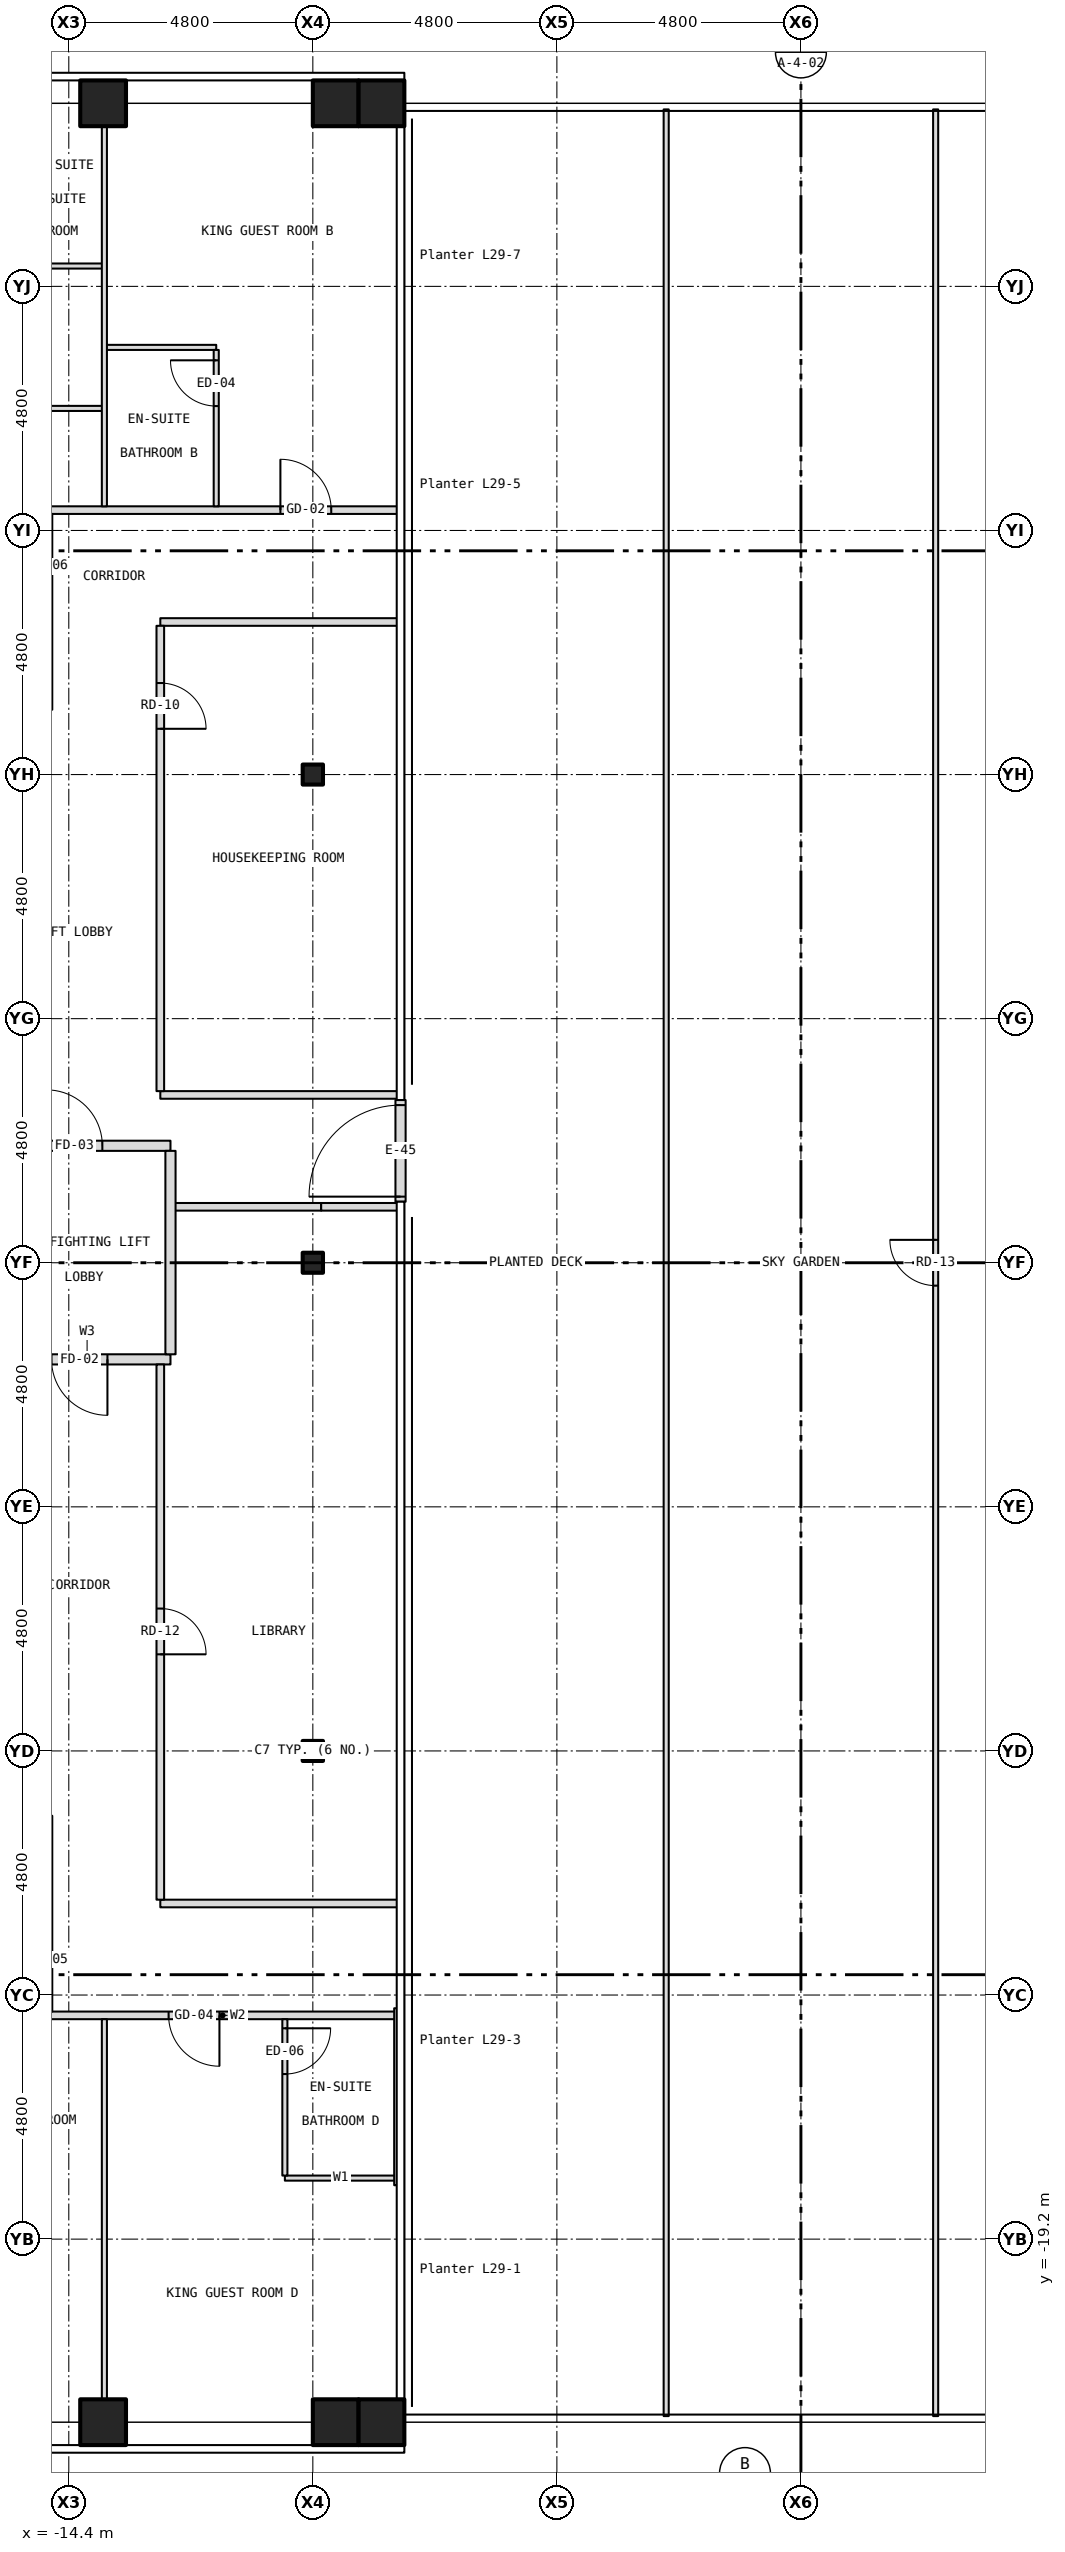
"""IFC4 building model, lengths in metres.
Left out: names, types, materials, properties, quantities, classifications, styles, units other than length and angle.
Written with IfcOpenShell. Run it as: python <this file> out.ifc"""

import sys

from ifc_helpers import new_model, si_unit, direction, frame, frame_2d, origin, origin_2d, place, context, subcontext, project, spatial, rectangle, hollow_rectangle, i_section, extrude, element, fill, save


model = new_model("IFC4")
c1 = context("Model", 3, precision=1e-05, world=origin(), true_north=direction((0.0, 1.0)))
c2 = subcontext(c1, "Body", "Model", "MODEL_VIEW")
j1 = project(units=[si_unit("LENGTHUNIT", "METRE"), si_unit("PLANEANGLEUNIT", "RADIAN")], contexts=[c1])
p1 = place(None, origin())
s1 = spatial("IfcSite", under=j1, at=p1, CompositionType="ELEMENT")
p2 = place(p1, origin())
s2 = spatial("IfcBuilding", under=s1, at=p2, CompositionType="ELEMENT")
p3 = place(p2, frame((0.0, 0.0, 117.0)))
s3 = spatial("IfcBuildingStorey", under=s2, at=p3, CompositionType="ELEMENT", Elevation=117.0)
for number, where, z_axis, x_axis in (
    (1, (-13.725, 22.8, -0.15), (0.0, 0.0, 1.0), (1.0, 0.0, 0.0)),
    (2, (-13.725, -22.8, -0.15), (0.0, 0.0, 1.0), (1.0, 0.0, 0.0)),
    (3, (-9.15, 22.8, -0.15), (0.0, 0.0, 1.0), (1.0, 0.0, 0.0)),
    (4, (-9.15, -22.8, -0.15), (0.0, 0.0, 1.0), (1.0, 0.0, 0.0)),
    (5, (-8.25, 22.8, -0.15), (0.0, 0.0, 1.0), (1.0, 0.0, 0.0)),
    (6, (-8.25, -22.8, -0.15), (0.0, 0.0, 1.0), (1.0, 0.0, 0.0)),
):
    element("IfcColumn", number, at=place(p3, frame(where, z_axis=z_axis, x_axis=x_axis)), inside=s3, PredefinedType="COLUMN", context=c2, shape_type="SweptSolid", body=[
        extrude(hollow_rectangle(XDim=0.9, YDim=0.9, WallThickness=0.05, at=origin_2d()), origin(), (0.0, 0.0, 1.0), 3.5),
    ])
for number, where, z_axis, x_axis in (
    (7, (-9.6, -9.6, -0.15), (0.0, 0.0, 1.0), (1.0, 0.0, 0.0)),
    (8, (-9.6, 0.0, -0.15), (0.0, 0.0, 1.0), (1.0, 0.0, 0.0)),
    (9, (-9.6, 9.6, -0.15), (0.0, 0.0, 1.0), (1.0, 0.0, 0.0)),
):
    element("IfcColumn", number, at=place(p3, frame(where, z_axis=z_axis, x_axis=x_axis)), inside=s3, PredefinedType="COLUMN", context=c2, shape_type="SweptSolid", body=[
        extrude(i_section(OverallWidth=0.399, OverallDepth=0.394, WebThickness=0.023, FlangeThickness=0.037, at=origin_2d()), origin(), (0.0, 0.0, 1.0), 3.5),
    ])
p4 = place(p3, frame((-7.875, 1.2, 0.0), z_axis=(0.0, 0.0, 1.0), x_axis=(0.0, 1.0, 0.0)))
e10 = element("IfcWall", 10, at=p4, inside=s3, PredefinedType="SOLIDWALL", context=c2, shape_type="SweptSolid", body=[
    extrude(rectangle(XDim=2.0, YDim=0.2, at=frame_2d((1.0, 0.0))), origin(), (0.0, 0.0, 1.0), 2.593),
])
p5 = place(p4, frame((0.1, 0.0, 0.0)))
e11 = element("IfcOpeningElement", 11, at=p5, cuts=e10, PredefinedType="OPENING", context=c2, shape_type="SweptSolid", body=[
    extrude(rectangle(XDim=1.8, YDim=2.1, at=frame_2d((0.9, 1.05))), frame((0.0, 0.112, 0.0), z_axis=(0.0, -1.0, 0.0), x_axis=(1.0, 0.0, 0.0)), (0.0, 0.0, 1.0), 0.224),
])
p6 = place(p3, frame((-10.15, -18.0, 0.0), z_axis=(0.0, 0.0, 1.0), x_axis=(1.0, 0.0, 0.0)))
e12 = element("IfcWall", 12, at=p6, inside=s3, PredefinedType="PARTITIONING", context=c2, shape_type="SweptSolid", body=[
    extrude(rectangle(XDim=2.2, YDim=0.1, at=frame_2d((1.1, 0.0))), origin(), (0.0, 0.0, 1.0), 3.35),
])
p7 = place(p3, frame((-14.8, -14.8, 0.0), z_axis=(0.0, 0.0, 1.0), x_axis=(1.0, 0.0, 0.0)))
e13 = element("IfcWall", 13, at=p7, inside=s3, PredefinedType="PARTITIONING", context=c2, shape_type="SweptSolid", body=[
    extrude(rectangle(XDim=6.85, YDim=0.15, at=frame_2d((3.425, 0.0))), origin(), (0.0, 0.0, 1.0), 3.35),
])
p8 = place(p7, frame((2.363, 0.0, 0.0)))
e14 = element("IfcOpeningElement", 14, at=p8, cuts=e13, PredefinedType="OPENING", context=c2, shape_type="SweptSolid", body=[
    extrude(rectangle(XDim=1.0, YDim=2.1, at=frame_2d((0.5, 1.05))), frame((0.0, 0.087, 0.0), z_axis=(0.0, -1.0, 0.0), x_axis=(1.0, 0.0, 0.0)), (0.0, 0.0, 1.0), 0.174),
])
p9 = place(p3, frame((-12.6, -12.6, 0.0), z_axis=(0.0, 0.0, 1.0), x_axis=(1.0, 0.0, 0.0)))
e15 = element("IfcWall", 15, at=p9, inside=s3, PredefinedType="PARTITIONING", context=c2, shape_type="SweptSolid", body=[
    extrude(rectangle(XDim=4.68, YDim=0.15, at=frame_2d((2.34, 0.0))), origin(), (0.0, 0.0, 1.0), 3.35),
])
p10 = place(p3, frame((-15.68, -1.9, 0.0), z_axis=(0.0, 0.0, 1.0), x_axis=(1.0, 0.0, 0.0)))
e16 = element("IfcWall", 16, at=p10, inside=s3, PredefinedType="PARTITIONING", context=c2, shape_type="SweptSolid", body=[
    extrude(rectangle(XDim=3.28, YDim=0.2, at=frame_2d((1.64, 0.0))), origin(), (0.0, 0.0, 1.0), 3.35),
])
p11 = place(p10, frame((0.94, 0.0, 0.0)))
e17 = element("IfcOpeningElement", 17, at=p11, cuts=e16, PredefinedType="OPENING", context=c2, shape_type="SweptSolid", body=[
    extrude(rectangle(XDim=1.1, YDim=2.1, at=frame_2d((0.55, 1.05))), frame((0.0, 0.112, 0.0), z_axis=(0.0, -1.0, 0.0), x_axis=(1.0, 0.0, 0.0)), (0.0, 0.0, 1.0), 0.224),
])
p12 = place(p3, frame((-12.4, 1.1, 0.0), z_axis=(0.0, 0.0, 1.0), x_axis=(1.0, 0.0, 0.0)))
e18 = element("IfcWall", 18, at=p12, inside=s3, PredefinedType="PARTITIONING", context=c2, shape_type="SweptSolid", body=[
    extrude(rectangle(XDim=2.964, YDim=0.15, at=frame_2d((1.482, 0.0))), origin(), (0.0, 0.0, 1.0), 3.35),
])
p13 = place(p3, frame((-9.436, 1.1, 0.0), z_axis=(0.0, 0.0, 1.0), x_axis=(1.0, 0.0, 0.0)))
e19 = element("IfcWall", 19, at=p13, inside=s3, PredefinedType="PARTITIONING", context=c2, shape_type="SweptSolid", body=[
    extrude(rectangle(XDim=1.516, YDim=0.15, at=frame_2d((0.758, 0.0))), origin(), (0.0, 0.0, 1.0), 2.593),
])
p14 = place(p3, frame((-15.68, 2.3, 0.0), z_axis=(0.0, 0.0, 1.0), x_axis=(1.0, 0.0, 0.0)))
e20 = element("IfcWall", 20, at=p14, inside=s3, PredefinedType="PARTITIONING", context=c2, shape_type="SweptSolid", body=[
    extrude(rectangle(XDim=3.28, YDim=0.2, at=frame_2d((1.64, 0.0))), origin(), (0.0, 0.0, 1.0), 3.35),
])
p15 = place(p14, frame((0.84, 0.0, 0.0)))
e21 = element("IfcOpeningElement", 21, at=p15, cuts=e20, PredefinedType="OPENING", context=c2, shape_type="SweptSolid", body=[
    extrude(rectangle(XDim=1.1, YDim=2.1, at=frame_2d((0.55, 1.05))), frame((0.0, 0.112, 0.0), z_axis=(0.0, -1.0, 0.0), x_axis=(1.0, 0.0, 0.0)), (0.0, 0.0, 1.0), 0.224),
])
for number, where, z_axis, x_axis in (
    (22, (-12.6, 3.3, 0.0), (0.0, 0.0, 1.0), (1.0, 0.0, 0.0)),
    (23, (-12.6, 12.6, 0.0), (0.0, 0.0, 1.0), (1.0, 0.0, 0.0)),
):
    element("IfcWall", number, at=place(p3, frame(where, z_axis=z_axis, x_axis=x_axis)), inside=s3, PredefinedType="PARTITIONING", context=c2, shape_type="SweptSolid", body=[
        extrude(rectangle(XDim=4.68, YDim=0.15, at=frame_2d((2.34, 0.0))), origin(), (0.0, 0.0, 1.0), 3.35),
    ])
p16 = place(p3, frame((-14.8, 14.8, 0.0), z_axis=(0.0, 0.0, 1.0), x_axis=(1.0, 0.0, 0.0)))
e24 = element("IfcWall", 24, at=p16, inside=s3, PredefinedType="PARTITIONING", context=c2, shape_type="SweptSolid", body=[
    extrude(rectangle(XDim=6.88, YDim=0.15, at=frame_2d((3.44, 0.0))), origin(), (0.0, 0.0, 1.0), 3.35),
])
p17 = place(p16, frame((4.562, 0.0, 0.0)))
e25 = element("IfcOpeningElement", 25, at=p17, cuts=e24, PredefinedType="OPENING", context=c2, shape_type="SweptSolid", body=[
    extrude(rectangle(XDim=1.0, YDim=2.1, at=frame_2d((0.5, 1.05))), frame((0.0, 0.087, 0.0), z_axis=(0.0, -1.0, 0.0), x_axis=(1.0, 0.0, 0.0)), (0.0, 0.0, 1.0), 0.174),
])
p18 = place(p3, frame((-23.28, 16.8, 0.0), z_axis=(0.0, 0.0, 1.0), x_axis=(1.0, 0.0, 0.0)))
e26 = element("IfcWall", 26, at=p18, inside=s3, PredefinedType="PARTITIONING", context=c2, shape_type="SweptSolid", body=[
    extrude(rectangle(XDim=9.58, YDim=0.1, at=frame_2d((4.79, 0.0))), origin(), (0.0, 0.0, 1.0), 3.35),
])
p19 = place(p18, frame((5.468, 0.0, 0.0)))
e27 = element("IfcOpeningElement", 27, at=p19, cuts=e26, PredefinedType="OPENING", context=c2, shape_type="SweptSolid", body=[
    extrude(rectangle(XDim=0.9, YDim=2.1, at=frame_2d((0.45, 1.05))), frame((0.0, 0.062, 0.0), z_axis=(0.0, -1.0, 0.0), x_axis=(1.0, 0.0, 0.0)), (0.0, 0.0, 1.0), 0.124),
])
for number, where, z_axis, x_axis in (
    (28, (-13.7, 18.0, 0.0), (0.0, 0.0, 1.0), (1.0, 0.0, 0.0)),
    (29, (-15.9, 19.6, 0.0), (0.0, 0.0, 1.0), (1.0, 0.0, 0.0)),
):
    element("IfcWall", number, at=place(p3, frame(where, z_axis=z_axis, x_axis=x_axis)), inside=s3, PredefinedType="PARTITIONING", context=c2, shape_type="SweptSolid", body=[
        extrude(rectangle(XDim=2.2, YDim=0.1, at=frame_2d((1.1, 0.0))), origin(), (0.0, 0.0, 1.0), 3.35),
    ])
for number, where, z_axis, x_axis in (
    (30, (-13.7, -22.68, 0.0), (0.0, 0.0, 1.0), (0.0, 1.0, 0.0)),
    (31, (-13.7, 14.875, 0.0), (0.0, 0.0, 1.0), (0.0, 1.0, 0.0)),
):
    element("IfcWall", number, at=place(p3, frame(where, z_axis=z_axis, x_axis=x_axis)), inside=s3, PredefinedType="PARTITIONING", context=c2, shape_type="SweptSolid", body=[
        extrude(rectangle(XDim=7.805, YDim=0.1, at=frame_2d((3.902, 0.0))), origin(), (0.0, 0.0, 1.0), 3.35),
    ])
p20 = place(p3, frame((-12.6, -12.525, 0.0), z_axis=(0.0, 0.0, 1.0), x_axis=(0.0, 1.0, 0.0)))
e32 = element("IfcWall", 32, at=p20, inside=s3, PredefinedType="PARTITIONING", context=c2, shape_type="SweptSolid", body=[
    extrude(rectangle(XDim=10.525, YDim=0.15, at=frame_2d((5.262, 0.0))), origin(), (0.0, 0.0, 1.0), 3.35),
])
p21 = place(p20, frame((4.825, 0.0, 0.0)))
e33 = element("IfcOpeningElement", 33, at=p21, cuts=e32, PredefinedType="OPENING", context=c2, shape_type="SweptSolid", body=[
    extrude(rectangle(XDim=0.9, YDim=2.1, at=frame_2d((0.45, 1.05))), frame((0.0, 0.087, 0.0), z_axis=(0.0, -1.0, 0.0), x_axis=(1.0, 0.0, 0.0)), (0.0, 0.0, 1.0), 0.174),
])
p22 = place(p3, frame((-12.6, 3.375, 0.0), z_axis=(0.0, 0.0, 1.0), x_axis=(0.0, 1.0, 0.0)))
e34 = element("IfcWall", 34, at=p22, inside=s3, PredefinedType="PARTITIONING", context=c2, shape_type="SweptSolid", body=[
    extrude(rectangle(XDim=9.15, YDim=0.15, at=frame_2d((4.575, 0.0))), origin(), (0.0, 0.0, 1.0), 3.35),
])
p23 = place(p22, frame((7.125, 0.0, 0.0)))
e35 = element("IfcOpeningElement", 35, at=p23, cuts=e34, PredefinedType="OPENING", context=c2, shape_type="SweptSolid", body=[
    extrude(rectangle(XDim=0.9, YDim=2.1, at=frame_2d((0.45, 1.05))), frame((0.0, 0.087, 0.0), z_axis=(0.0, -1.0, 0.0), x_axis=(1.0, 0.0, 0.0)), (0.0, 0.0, 1.0), 0.174),
])
p24 = place(p3, frame((-12.4, -1.8, 0.0), z_axis=(0.0, 0.0, 1.0), x_axis=(0.0, 1.0, 0.0)))
e36 = element("IfcWall", 36, at=p24, inside=s3, PredefinedType="PARTITIONING", context=c2, shape_type="SweptSolid", body=[
    extrude(rectangle(XDim=4.0, YDim=0.2, at=frame_2d((2.0, 0.0))), origin(), (0.0, 0.0, 1.0), 3.35),
])
p25 = place(p3, frame((-11.5, 14.875, 0.0), z_axis=(0.0, 0.0, 1.0), x_axis=(0.0, 1.0, 0.0)))
e37 = element("IfcWall", 37, at=p25, inside=s3, PredefinedType="PARTITIONING", context=c2, shape_type="SweptSolid", body=[
    extrude(rectangle(XDim=3.075, YDim=0.1, at=frame_2d((1.538, 0.0))), origin(), (0.0, 0.0, 1.0), 3.35),
])
p26 = place(p25, frame((1.971, 0.0, 0.0)))
e38 = element("IfcOpeningElement", 38, at=p26, cuts=e37, PredefinedType="OPENING", context=c2, shape_type="SweptSolid", body=[
    extrude(rectangle(XDim=0.9, YDim=2.1, at=frame_2d((0.45, 1.05))), frame((0.0, 0.062, 0.0), z_axis=(0.0, -1.0, 0.0), x_axis=(1.0, 0.0, 0.0)), (0.0, 0.0, 1.0), 0.124),
])
p27 = place(p3, frame((-10.15, -17.95, 0.0), z_axis=(0.0, 0.0, 1.0), x_axis=(0.0, 1.0, 0.0)))
e39 = element("IfcWall", 39, at=p27, inside=s3, PredefinedType="PARTITIONING", context=c2, shape_type="SweptSolid", body=[
    extrude(rectangle(XDim=3.075, YDim=0.1, at=frame_2d((1.538, 0.0))), origin(), (0.0, 0.0, 1.0), 3.35),
])
p28 = place(p27, frame((1.996, 0.0, 0.0)))
e40 = element("IfcOpeningElement", 40, at=p28, cuts=e39, PredefinedType="OPENING", context=c2, shape_type="SweptSolid", body=[
    extrude(rectangle(XDim=0.9, YDim=2.1, at=frame_2d((0.45, 1.05))), frame((0.0, 0.062, 0.0), z_axis=(0.0, -1.0, 0.0), x_axis=(1.0, 0.0, 0.0)), (0.0, 0.0, 1.0), 0.124),
])
p29 = place(p3, frame((-7.95, -18.14, 0.0), z_axis=(0.0, 0.0, 1.0), x_axis=(0.0, 1.0, 0.0)))
e41 = element("IfcWall", 41, at=p29, inside=s3, PredefinedType="PARTITIONING", context=c2, shape_type="SweptSolid", body=[
    extrude(rectangle(XDim=3.48, YDim=0.1, at=frame_2d((1.74, 0.0))), origin(), (0.0, 0.0, 1.0), 2.733),
])
p30 = place(p3, frame((-2.65, -22.68, 0.0), z_axis=(0.0, 0.0, 1.0), x_axis=(0.0, 1.0, 0.0)))
e42 = element("IfcWall", 42, at=p30, inside=s3, PredefinedType="PARTITIONING", context=c2, shape_type="SweptSolid", body=[
    extrude(rectangle(XDim=45.36, YDim=0.1, at=frame_2d((22.68, 0.0))), origin(), (0.0, 0.0, 1.0), 3.35),
])
p31 = place(p3, frame((2.65, -22.68, 0.0), z_axis=(0.0, 0.0, 1.0), x_axis=(0.0, 1.0, 0.0)))
e43 = element("IfcWall", 43, at=p31, inside=s3, PredefinedType="PARTITIONING", context=c2, shape_type="SweptSolid", body=[
    extrude(rectangle(XDim=45.36, YDim=0.1, at=frame_2d((22.68, 0.0))), origin(), (0.0, 0.0, 1.0), 3.35),
])
p32 = place(p31, frame((22.23, 0.0, 0.0)))
e44 = element("IfcOpeningElement", 44, at=p32, cuts=e43, PredefinedType="OPENING", context=c2, shape_type="SweptSolid", body=[
    extrude(rectangle(XDim=0.9, YDim=2.1, at=frame_2d((0.45, 1.05))), frame((0.0, 0.062, 0.0), z_axis=(0.0, -1.0, 0.0), x_axis=(1.0, 0.0, 0.0)), (0.0, 0.0, 1.0), 0.124),
])
p33 = place(p5, origin())
e45 = element("IfcDoor", 45, at=p33, inside=s3, OperationType="DOUBLE_DOOR_DOUBLE_SWING", PredefinedType="DOOR", context=c2, shape_type="SweptSolid", body=[
    extrude(rectangle(XDim=1.8, YDim=2.1, at=frame_2d((0.9, 1.05))), frame((0.0, 0.025, 0.0), z_axis=(0.0, -1.0, 0.0), x_axis=(1.0, 0.0, 0.0)), (0.0, 0.0, 1.0), 0.05),
])
fill(e11, e45)
p34 = place(p11, origin())
e46 = element("IfcDoor", 46, at=p34, inside=s3, OperationType="SINGLE_SWING_RIGHT", PredefinedType="DOOR", context=c2, shape_type="SweptSolid", body=[
    extrude(rectangle(XDim=1.1, YDim=2.1, at=frame_2d((0.55, 1.05))), frame((0.0, 0.025, 0.0), z_axis=(0.0, -1.0, 0.0), x_axis=(1.0, 0.0, 0.0)), (0.0, 0.0, 1.0), 0.05),
])
fill(e17, e46)
p35 = place(p15, origin())
e47 = element("IfcDoor", 47, at=p35, inside=s3, OperationType="SINGLE_SWING_LEFT", PredefinedType="DOOR", context=c2, shape_type="SweptSolid", body=[
    extrude(rectangle(XDim=1.1, YDim=2.1, at=frame_2d((0.55, 1.05))), frame((0.0, 0.025, 0.0), z_axis=(0.0, -1.0, 0.0), x_axis=(1.0, 0.0, 0.0)), (0.0, 0.0, 1.0), 0.05),
])
fill(e21, e47)
p36 = place(p17, origin())
e48 = element("IfcDoor", 48, at=p36, inside=s3, OperationType="SINGLE_SWING_LEFT", PredefinedType="DOOR", context=c2, shape_type="SweptSolid", body=[
    extrude(rectangle(XDim=1.0, YDim=2.1, at=frame_2d((0.5, 1.05))), frame((0.0, 0.025, 0.0), z_axis=(0.0, -1.0, 0.0), x_axis=(1.0, 0.0, 0.0)), (0.0, 0.0, 1.0), 0.05),
])
fill(e25, e48)
p37 = place(p26, origin())
e49 = element("IfcDoor", 49, at=p37, inside=s3, OperationType="SINGLE_SWING_RIGHT", PredefinedType="DOOR", context=c2, shape_type="SweptSolid", body=[
    extrude(rectangle(XDim=0.9, YDim=2.1, at=frame_2d((0.45, 1.05))), frame((0.0, 0.025, 0.0), z_axis=(0.0, -1.0, 0.0), x_axis=(1.0, 0.0, 0.0)), (0.0, 0.0, 1.0), 0.05),
])
fill(e38, e49)
p38 = place(p8, origin())
e50 = element("IfcDoor", 50, at=p38, inside=s3, OperationType="SINGLE_SWING_RIGHT", PredefinedType="DOOR", context=c2, shape_type="SweptSolid", body=[
    extrude(rectangle(XDim=1.0, YDim=2.1, at=frame_2d((0.5, 1.05))), frame((0.0, 0.025, 0.0), z_axis=(0.0, -1.0, 0.0), x_axis=(1.0, 0.0, 0.0)), (0.0, 0.0, 1.0), 0.05),
])
fill(e14, e50)
p39 = place(p28, origin())
e51 = element("IfcDoor", 51, at=p39, inside=s3, OperationType="SINGLE_SWING_RIGHT", PredefinedType="DOOR", context=c2, shape_type="SweptSolid", body=[
    extrude(rectangle(XDim=0.9, YDim=2.1, at=frame_2d((0.45, 1.05))), frame((0.0, 0.025, 0.0), z_axis=(0.0, -1.0, 0.0), x_axis=(1.0, 0.0, 0.0)), (0.0, 0.0, 1.0), 0.05),
])
fill(e40, e51)
p40 = place(p23, origin())
e52 = element("IfcDoor", 52, at=p40, inside=s3, OperationType="SINGLE_SWING_LEFT", PredefinedType="DOOR", context=c2, shape_type="SweptSolid", body=[
    extrude(rectangle(XDim=0.9, YDim=2.1, at=frame_2d((0.45, 1.05))), frame((0.0, 0.025, 0.0), z_axis=(0.0, -1.0, 0.0), x_axis=(1.0, 0.0, 0.0)), (0.0, 0.0, 1.0), 0.05),
])
fill(e35, e52)
p41 = place(p21, origin())
e53 = element("IfcDoor", 53, at=p41, inside=s3, OperationType="SINGLE_SWING_LEFT", PredefinedType="DOOR", context=c2, shape_type="SweptSolid", body=[
    extrude(rectangle(XDim=0.9, YDim=2.1, at=frame_2d((0.45, 1.05))), frame((0.0, 0.025, 0.0), z_axis=(0.0, -1.0, 0.0), x_axis=(1.0, 0.0, 0.0)), (0.0, 0.0, 1.0), 0.05),
])
fill(e33, e53)
p42 = place(p32, origin())
e54 = element("IfcDoor", 54, at=p42, inside=s3, OperationType="SINGLE_SWING_RIGHT", PredefinedType="DOOR", context=c2, shape_type="SweptSolid", body=[
    extrude(rectangle(XDim=0.9, YDim=2.1, at=frame_2d((0.45, 1.05))), frame((0.0, 0.025, 0.0), z_axis=(0.0, -1.0, 0.0), x_axis=(1.0, 0.0, 0.0)), (0.0, 0.0, 1.0), 0.05),
])
fill(e44, e54)
save(model, sys.argv[1])
